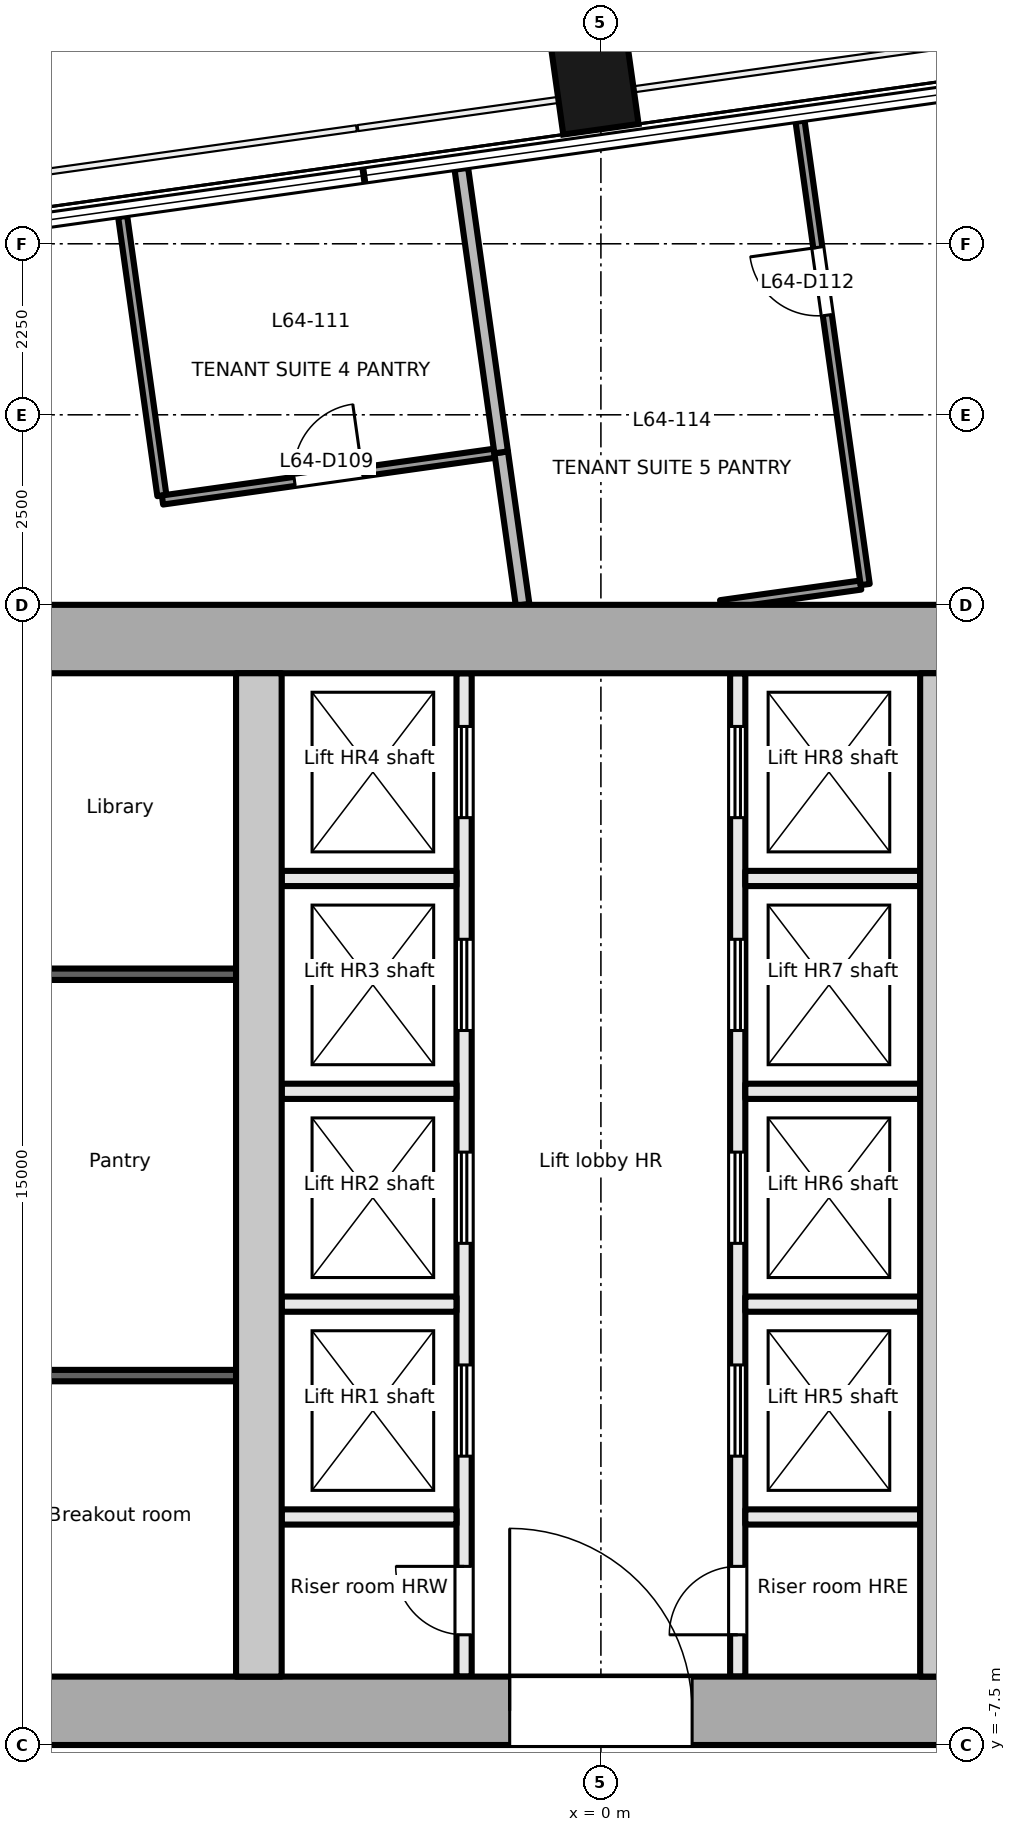
"""IFC4 building model, lengths in metres.
Left out: names, types, materials, properties, quantities, classifications, styles, units other than length and angle.
Written with IfcOpenShell. Run it as: python <this file> out.ifc"""

import sys

from ifc_helpers import new_model, si_unit, direction, frame, frame_2d, origin, origin_2d, place, context, subcontext, project, spatial, rectangle, extrude, element, fill, save


model = new_model("IFC4")
c1 = context("Model", 3, precision=1e-05, world=origin(), true_north=direction((0.0, 1.0)))
c2 = subcontext(c1, "Body", "Model", "MODEL_VIEW")
j1 = project(units=[si_unit("LENGTHUNIT", "METRE"), si_unit("PLANEANGLEUNIT", "RADIAN")], contexts=[c1])
p1 = place(None, origin())
s1 = spatial("IfcSite", under=j1, at=p1, CompositionType="ELEMENT")
p2 = place(p1, origin())
s2 = spatial("IfcBuilding", under=s1, at=p2, CompositionType="ELEMENT")
p3 = place(p2, frame((0.0, 0.0, 278.5)))
s3 = spatial("IfcBuildingStorey", under=s2, at=p3, CompositionType="ELEMENT", Elevation=278.5)
p4 = place(p3, frame((-0.125, 14.648, -0.2), z_axis=(0.0, 0.0, 1.0), x_axis=(0.990265639562, 0.139190384377, 0.0)))
e1 = element("IfcColumn", 1, at=p4, inside=s3, PredefinedType="COLUMN", context=c2, shape_type="SweptSolid", body=[
    extrude(rectangle(XDim=1.0, YDim=1.8, at=origin_2d()), origin(), (0.0, 0.0, 1.0), 3.9),
])
p5 = place(p3, frame((-18.0, -7.05, -0.2), z_axis=(0.0, 0.0, 1.0), x_axis=(1.0, 0.0, 0.0)))
e2 = element("IfcWall", 2, at=p5, inside=s3, PredefinedType="SHEAR", context=c2, shape_type="SweptSolid", body=[
    extrude(rectangle(XDim=36.0, YDim=0.9, at=frame_2d((18.0, 0.0))), origin(), (0.0, 0.0, 1.0), 3.9),
])
p6 = place(p5, frame((8.1, 0.0, 0.2)))
e3 = element("IfcOpeningElement", 3, at=p6, cuts=e2, PredefinedType="OPENING", context=c2, shape_type="SweptSolid", body=[
    extrude(rectangle(XDim=1.8, YDim=2.1, at=frame_2d((0.9, 1.05))), frame((0.0, 0.46, 0.0), z_axis=(0.0, -1.0, 0.0), x_axis=(1.0, 0.0, 0.0)), (0.0, 0.0, 1.0), 0.921),
])
p7 = place(p5, frame((16.8, 0.0, 0.2)))
e4 = element("IfcOpeningElement", 4, at=p7, cuts=e2, PredefinedType="OPENING", context=c2, shape_type="SweptSolid", body=[
    extrude(rectangle(XDim=2.4, YDim=2.1, at=frame_2d((1.2, 1.05))), frame((0.0, 0.46, 0.0), z_axis=(0.0, -1.0, 0.0), x_axis=(1.0, 0.0, 0.0)), (0.0, 0.0, 1.0), 0.921),
])
p8 = place(p5, frame((26.1, 0.0, 0.2)))
e5 = element("IfcOpeningElement", 5, at=p8, cuts=e2, PredefinedType="OPENING", context=c2, shape_type="SweptSolid", body=[
    extrude(rectangle(XDim=2.4, YDim=2.1, at=frame_2d((1.2, 1.05))), frame((0.0, 0.46, 0.0), z_axis=(0.0, -1.0, 0.0), x_axis=(1.0, 0.0, 0.0)), (0.0, 0.0, 1.0), 0.921),
])
p9 = place(p3, frame((-18.0, 7.05, -0.2), z_axis=(0.0, 0.0, 1.0), x_axis=(1.0, 0.0, 0.0)))
e6 = element("IfcWall", 6, at=p9, inside=s3, PredefinedType="SHEAR", context=c2, shape_type="SweptSolid", body=[
    extrude(rectangle(XDim=36.0, YDim=0.9, at=frame_2d((18.0, 0.0))), origin(), (0.0, 0.0, 1.0), 3.9),
])
for number, where, z_axis, x_axis in (
    (7, (-4.5, -6.6, -0.2), (0.0, 0.0, 1.0), (0.0, 1.0, 0.0)),
    (8, (4.5, -6.6, -0.2), (0.0, 0.0, 1.0), (0.0, 1.0, 0.0)),
):
    element("IfcWall", number, at=place(p3, frame(where, z_axis=z_axis, x_axis=x_axis)), inside=s3, PredefinedType="SHEAR", context=c2, shape_type="SweptSolid", body=[
        extrude(rectangle(XDim=13.2, YDim=0.6, at=frame_2d((6.6, 0.0))), origin(), (0.0, 0.0, 1.0), 3.9),
    ])
for number, where, z_axis, x_axis in (
    (9, (-7.85, -2.64, 0.0), (0.0, 0.0, 1.0), (1.0, 0.0, 0.0)),
    (10, (-7.85, 2.64, 0.0), (0.0, 0.0, 1.0), (1.0, 0.0, 0.0)),
):
    element("IfcWall", number, at=place(p3, frame(where, z_axis=z_axis, x_axis=x_axis)), inside=s3, PredefinedType="PARTITIONING", context=c2, shape_type="SweptSolid", body=[
        extrude(rectangle(XDim=3.05, YDim=0.15, at=frame_2d((1.525, 0.0))), origin(), (0.0, 0.0, 1.0), 3.7),
    ])
p10 = place(p3, frame((-1.8, -6.6, 0.0), z_axis=(0.0, 0.0, 1.0), x_axis=(0.0, 1.0, 0.0)))
e11 = element("IfcWall", 11, at=p10, inside=s3, PredefinedType="PARTITIONING", context=c2, shape_type="SweptSolid", body=[
    extrude(rectangle(XDim=13.2, YDim=0.2, at=frame_2d((6.6, 0.0))), origin(), (0.0, 0.0, 1.0), 3.7),
])
p11 = place(p10, frame((0.55, 0.0, 0.0)))
e12 = element("IfcOpeningElement", 12, at=p11, cuts=e11, PredefinedType="OPENING", context=c2, shape_type="SweptSolid", body=[
    extrude(rectangle(XDim=0.9, YDim=2.1, at=frame_2d((0.45, 1.05))), frame((0.0, 0.111, 0.0), z_axis=(0.0, -1.0, 0.0), x_axis=(1.0, 0.0, 0.0)), (0.0, 0.0, 1.0), 0.221),
])
p12 = place(p10, frame((2.9, 0.0, 0.0)))
e13 = element("IfcOpeningElement", 13, at=p12, cuts=e11, PredefinedType="OPENING", context=c2, shape_type="SweptSolid", body=[
    extrude(rectangle(XDim=1.2, YDim=2.1, at=frame_2d((0.6, 1.05))), frame((0.0, 0.111, 0.0), z_axis=(0.0, -1.0, 0.0), x_axis=(1.0, 0.0, 0.0)), (0.0, 0.0, 1.0), 0.221),
])
p13 = place(p10, frame((5.7, 0.0, 0.0)))
e14 = element("IfcOpeningElement", 14, at=p13, cuts=e11, PredefinedType="OPENING", context=c2, shape_type="SweptSolid", body=[
    extrude(rectangle(XDim=1.2, YDim=2.1, at=frame_2d((0.6, 1.05))), frame((0.0, 0.111, 0.0), z_axis=(0.0, -1.0, 0.0), x_axis=(1.0, 0.0, 0.0)), (0.0, 0.0, 1.0), 0.221),
])
p14 = place(p10, frame((8.5, 0.0, 0.0)))
e15 = element("IfcOpeningElement", 15, at=p14, cuts=e11, PredefinedType="OPENING", context=c2, shape_type="SweptSolid", body=[
    extrude(rectangle(XDim=1.2, YDim=2.1, at=frame_2d((0.6, 1.05))), frame((0.0, 0.111, 0.0), z_axis=(0.0, -1.0, 0.0), x_axis=(1.0, 0.0, 0.0)), (0.0, 0.0, 1.0), 0.221),
])
p15 = place(p10, frame((11.3, 0.0, 0.0)))
e16 = element("IfcOpeningElement", 16, at=p15, cuts=e11, PredefinedType="OPENING", context=c2, shape_type="SweptSolid", body=[
    extrude(rectangle(XDim=1.2, YDim=2.1, at=frame_2d((0.6, 1.05))), frame((0.0, 0.111, 0.0), z_axis=(0.0, -1.0, 0.0), x_axis=(1.0, 0.0, 0.0)), (0.0, 0.0, 1.0), 0.221),
])
p16 = place(p3, frame((1.8, -6.6, 0.0), z_axis=(0.0, 0.0, 1.0), x_axis=(0.0, 1.0, 0.0)))
e17 = element("IfcWall", 17, at=p16, inside=s3, PredefinedType="PARTITIONING", context=c2, shape_type="SweptSolid", body=[
    extrude(rectangle(XDim=13.2, YDim=0.2, at=frame_2d((6.6, 0.0))), origin(), (0.0, 0.0, 1.0), 3.7),
])
p17 = place(p16, frame((0.55, 0.0, 0.0)))
e18 = element("IfcOpeningElement", 18, at=p17, cuts=e17, PredefinedType="OPENING", context=c2, shape_type="SweptSolid", body=[
    extrude(rectangle(XDim=0.9, YDim=2.1, at=frame_2d((0.45, 1.05))), frame((0.0, 0.111, 0.0), z_axis=(0.0, -1.0, 0.0), x_axis=(1.0, 0.0, 0.0)), (0.0, 0.0, 1.0), 0.221),
])
p18 = place(p16, frame((2.9, 0.0, 0.0)))
e19 = element("IfcOpeningElement", 19, at=p18, cuts=e17, PredefinedType="OPENING", context=c2, shape_type="SweptSolid", body=[
    extrude(rectangle(XDim=1.2, YDim=2.1, at=frame_2d((0.6, 1.05))), frame((0.0, 0.111, 0.0), z_axis=(0.0, -1.0, 0.0), x_axis=(1.0, 0.0, 0.0)), (0.0, 0.0, 1.0), 0.221),
])
p19 = place(p16, frame((5.7, 0.0, 0.0)))
e20 = element("IfcOpeningElement", 20, at=p19, cuts=e17, PredefinedType="OPENING", context=c2, shape_type="SweptSolid", body=[
    extrude(rectangle(XDim=1.2, YDim=2.1, at=frame_2d((0.6, 1.05))), frame((0.0, 0.111, 0.0), z_axis=(0.0, -1.0, 0.0), x_axis=(1.0, 0.0, 0.0)), (0.0, 0.0, 1.0), 0.221),
])
p20 = place(p16, frame((8.5, 0.0, 0.0)))
e21 = element("IfcOpeningElement", 21, at=p20, cuts=e17, PredefinedType="OPENING", context=c2, shape_type="SweptSolid", body=[
    extrude(rectangle(XDim=1.2, YDim=2.1, at=frame_2d((0.6, 1.05))), frame((0.0, 0.111, 0.0), z_axis=(0.0, -1.0, 0.0), x_axis=(1.0, 0.0, 0.0)), (0.0, 0.0, 1.0), 0.221),
])
p21 = place(p16, frame((11.3, 0.0, 0.0)))
e22 = element("IfcOpeningElement", 22, at=p21, cuts=e17, PredefinedType="OPENING", context=c2, shape_type="SweptSolid", body=[
    extrude(rectangle(XDim=1.2, YDim=2.1, at=frame_2d((0.6, 1.05))), frame((0.0, 0.111, 0.0), z_axis=(0.0, -1.0, 0.0), x_axis=(1.0, 0.0, 0.0)), (0.0, 0.0, 1.0), 0.221),
])
for number, where, z_axis, x_axis in (
    (23, (-4.2, -1.7, 0.0), (0.0, 0.0, 1.0), (1.0, 0.0, 0.0)),
    (24, (-4.2, 1.1, 0.0), (0.0, 0.0, 1.0), (1.0, 0.0, 0.0)),
    (25, (-4.2, 3.9, 0.0), (0.0, 0.0, 1.0), (1.0, 0.0, 0.0)),
    (26, (-4.2, -4.5, 0.0), (0.0, 0.0, 1.0), (1.0, 0.0, 0.0)),
    (27, (1.9, -1.7, 0.0), (0.0, 0.0, 1.0), (1.0, 0.0, 0.0)),
    (28, (1.9, 1.1, 0.0), (0.0, 0.0, 1.0), (1.0, 0.0, 0.0)),
    (29, (1.9, 3.9, 0.0), (0.0, 0.0, 1.0), (1.0, 0.0, 0.0)),
    (30, (1.9, -4.5, 0.0), (0.0, 0.0, 1.0), (1.0, 0.0, 0.0)),
):
    element("IfcWall", number, at=place(p3, frame(where, z_axis=z_axis, x_axis=x_axis)), inside=s3, PredefinedType="PARTITIONING", context=c2, shape_type="SweptSolid", body=[
        extrude(rectangle(XDim=2.3, YDim=0.2, at=frame_2d((1.15, 0.0))), origin(), (0.0, 0.0, 1.0), 3.7),
    ])
p22 = place(p3, frame((-6.292, 12.61, 0.0), z_axis=(0.0, 0.0, 1.0), x_axis=(0.13918119099, -0.990266931728, 0.0)))
e31 = element("IfcWall", 31, at=p22, inside=s3, PredefinedType="PARTITIONING", context=c2, shape_type="SweptSolid", body=[
    extrude(rectangle(XDim=3.708, YDim=0.12, at=frame_2d((1.854, 0.0))), origin(), (0.0, 0.0, 1.0), 3.7),
])
p23 = place(p3, frame((-5.768, 8.879, 0.0), z_axis=(0.0, 0.0, 1.0), x_axis=(0.990229842837, 0.139444821898, 0.0)))
e32 = element("IfcWall", 32, at=p23, inside=s3, PredefinedType="PARTITIONING", context=c2, shape_type="SweptSolid", body=[
    extrude(rectangle(XDim=4.41, YDim=0.12, at=frame_2d((2.205, 0.0))), origin(), (0.0, 0.0, 1.0), 3.4),
])
p24 = place(p23, frame((1.755, 0.0, 0.0)))
e33 = element("IfcOpeningElement", 33, at=p24, cuts=e32, PredefinedType="OPENING", context=c2, shape_type="SweptSolid", body=[
    extrude(rectangle(XDim=0.9, YDim=2.1, at=frame_2d((0.45, 1.05))), frame((0.0, 0.071, 0.0), z_axis=(0.0, -1.0, 0.0), x_axis=(1.0, 0.0, 0.0)), (0.0, 0.0, 1.0), 0.141),
])
p25 = place(p3, frame((-1.312, 9.506, 0.0), z_axis=(0.0, 0.0, 1.0), x_axis=(0.139193896019, -0.990265145964, 0.0)))
e34 = element("IfcWall", 34, at=p25, inside=s3, PredefinedType="PARTITIONING", context=c2, shape_type="SweptSolid", body=[
    extrude(rectangle(XDim=2.026, YDim=0.18, at=frame_2d((1.013, 0.0))), origin(), (0.0, 0.0, 1.0), 3.7),
])
p26 = place(p3, frame((-1.836, 13.237, 0.0), z_axis=(0.0, 0.0, 1.0), x_axis=(0.139062210866, -0.990283646997, 0.0)))
e35 = element("IfcWall", 35, at=p26, inside=s3, PredefinedType="PARTITIONING", context=c2, shape_type="SweptSolid", body=[
    extrude(rectangle(XDim=3.768, YDim=0.18, at=frame_2d((1.884, 0.0))), origin(), (0.0, 0.0, 1.0), 3.7),
])
p27 = place(p3, frame((1.576, 7.502, 0.0), z_axis=(0.0, 0.0, 1.0), x_axis=(0.990319013032, 0.138810130855, 0.0)))
e36 = element("IfcWall", 36, at=p27, inside=s3, PredefinedType="PARTITIONING", context=c2, shape_type="SweptSolid", body=[
    extrude(rectangle(XDim=1.859, YDim=0.12, at=frame_2d((0.93, 0.0))), origin(), (0.0, 0.0, 1.0), 3.7),
])
p28 = place(p3, frame((3.477, 7.767, 0.0), z_axis=(0.0, 0.0, 1.0), x_axis=(-0.13920561026, 0.990263499313, 0.0)))
e37 = element("IfcWall", 37, at=p28, inside=s3, PredefinedType="PARTITIONING", context=c2, shape_type="SweptSolid", body=[
    extrude(rectangle(XDim=6.156, YDim=0.12, at=frame_2d((3.078, 0.0))), origin(), (0.0, 0.0, 1.0), 3.7),
])
p29 = place(p28, frame((3.579, 0.0, 0.0)))
e38 = element("IfcOpeningElement", 38, at=p29, cuts=e37, PredefinedType="OPENING", context=c2, shape_type="SweptSolid", body=[
    extrude(rectangle(XDim=0.9, YDim=2.1, at=frame_2d((0.45, 1.05))), frame((0.0, 0.071, 0.0), z_axis=(0.0, -1.0, 0.0), x_axis=(1.0, 0.0, 0.0)), (0.0, 0.0, 1.0), 0.141),
])
p30 = place(p11, origin())
e39 = element("IfcDoor", 39, at=p30, inside=s3, OperationType="SINGLE_SWING_RIGHT", PredefinedType="DOOR", context=c2, shape_type="SweptSolid", body=[
    extrude(rectangle(XDim=0.9, YDim=2.1, at=frame_2d((0.45, 1.05))), frame((0.0, 0.025, 0.0), z_axis=(0.0, -1.0, 0.0), x_axis=(1.0, 0.0, 0.0)), (0.0, 0.0, 1.0), 0.05),
])
fill(e12, e39)
p31 = place(p12, origin())
e40 = element("IfcDoor", 40, at=p31, inside=s3, OperationType="DOUBLE_DOOR_SLIDING", PredefinedType="DOOR", context=c2, shape_type="SweptSolid", body=[
    extrude(rectangle(XDim=1.2, YDim=2.1, at=frame_2d((0.6, 1.05))), frame((0.0, 0.025, 0.0), z_axis=(0.0, -1.0, 0.0), x_axis=(1.0, 0.0, 0.0)), (0.0, 0.0, 1.0), 0.05),
])
fill(e13, e40)
p32 = place(p13, origin())
e41 = element("IfcDoor", 41, at=p32, inside=s3, OperationType="DOUBLE_DOOR_SLIDING", PredefinedType="DOOR", context=c2, shape_type="SweptSolid", body=[
    extrude(rectangle(XDim=1.2, YDim=2.1, at=frame_2d((0.6, 1.05))), frame((0.0, 0.025, 0.0), z_axis=(0.0, -1.0, 0.0), x_axis=(1.0, 0.0, 0.0)), (0.0, 0.0, 1.0), 0.05),
])
fill(e14, e41)
p33 = place(p14, origin())
e42 = element("IfcDoor", 42, at=p33, inside=s3, OperationType="DOUBLE_DOOR_SLIDING", PredefinedType="DOOR", context=c2, shape_type="SweptSolid", body=[
    extrude(rectangle(XDim=1.2, YDim=2.1, at=frame_2d((0.6, 1.05))), frame((0.0, 0.025, 0.0), z_axis=(0.0, -1.0, 0.0), x_axis=(1.0, 0.0, 0.0)), (0.0, 0.0, 1.0), 0.05),
])
fill(e15, e42)
p34 = place(p15, origin())
e43 = element("IfcDoor", 43, at=p34, inside=s3, OperationType="DOUBLE_DOOR_SLIDING", PredefinedType="DOOR", context=c2, shape_type="SweptSolid", body=[
    extrude(rectangle(XDim=1.2, YDim=2.1, at=frame_2d((0.6, 1.05))), frame((0.0, 0.025, 0.0), z_axis=(0.0, -1.0, 0.0), x_axis=(1.0, 0.0, 0.0)), (0.0, 0.0, 1.0), 0.05),
])
fill(e16, e43)
p35 = place(p17, origin())
e44 = element("IfcDoor", 44, at=p35, inside=s3, OperationType="SINGLE_SWING_LEFT", PredefinedType="DOOR", context=c2, shape_type="SweptSolid", body=[
    extrude(rectangle(XDim=0.9, YDim=2.1, at=frame_2d((0.45, 1.05))), frame((0.0, 0.025, 0.0), z_axis=(0.0, -1.0, 0.0), x_axis=(1.0, 0.0, 0.0)), (0.0, 0.0, 1.0), 0.05),
])
fill(e18, e44)
p36 = place(p18, origin())
e45 = element("IfcDoor", 45, at=p36, inside=s3, OperationType="DOUBLE_DOOR_SLIDING", PredefinedType="DOOR", context=c2, shape_type="SweptSolid", body=[
    extrude(rectangle(XDim=1.2, YDim=2.1, at=frame_2d((0.6, 1.05))), frame((0.0, 0.025, 0.0), z_axis=(0.0, -1.0, 0.0), x_axis=(1.0, 0.0, 0.0)), (0.0, 0.0, 1.0), 0.05),
])
fill(e19, e45)
p37 = place(p19, origin())
e46 = element("IfcDoor", 46, at=p37, inside=s3, OperationType="DOUBLE_DOOR_SLIDING", PredefinedType="DOOR", context=c2, shape_type="SweptSolid", body=[
    extrude(rectangle(XDim=1.2, YDim=2.1, at=frame_2d((0.6, 1.05))), frame((0.0, 0.025, 0.0), z_axis=(0.0, -1.0, 0.0), x_axis=(1.0, 0.0, 0.0)), (0.0, 0.0, 1.0), 0.05),
])
fill(e20, e46)
p38 = place(p20, origin())
e47 = element("IfcDoor", 47, at=p38, inside=s3, OperationType="DOUBLE_DOOR_SLIDING", PredefinedType="DOOR", context=c2, shape_type="SweptSolid", body=[
    extrude(rectangle(XDim=1.2, YDim=2.1, at=frame_2d((0.6, 1.05))), frame((0.0, 0.025, 0.0), z_axis=(0.0, -1.0, 0.0), x_axis=(1.0, 0.0, 0.0)), (0.0, 0.0, 1.0), 0.05),
])
fill(e21, e47)
p39 = place(p21, origin())
e48 = element("IfcDoor", 48, at=p39, inside=s3, OperationType="DOUBLE_DOOR_SLIDING", PredefinedType="DOOR", context=c2, shape_type="SweptSolid", body=[
    extrude(rectangle(XDim=1.2, YDim=2.1, at=frame_2d((0.6, 1.05))), frame((0.0, 0.025, 0.0), z_axis=(0.0, -1.0, 0.0), x_axis=(1.0, 0.0, 0.0)), (0.0, 0.0, 1.0), 0.05),
])
fill(e22, e48)
p40 = place(p7, origin())
e49 = element("IfcDoor", 49, at=p40, inside=s3, OperationType="DOUBLE_DOOR_DOUBLE_SWING", PredefinedType="DOOR", context=c2, shape_type="SweptSolid", body=[
    extrude(rectangle(XDim=2.4, YDim=2.1, at=frame_2d((1.2, 1.05))), frame((0.0, 0.025, 0.0), z_axis=(0.0, -1.0, 0.0), x_axis=(1.0, 0.0, 0.0)), (0.0, 0.0, 1.0), 0.05),
])
fill(e4, e49)
p41 = place(p24, origin())
e50 = element("IfcDoor", 50, at=p41, inside=s3, OperationType="SINGLE_SWING_RIGHT", PredefinedType="DOOR", context=c2, shape_type="SweptSolid", body=[
    extrude(rectangle(XDim=0.9, YDim=2.1, at=frame_2d((0.45, 1.05))), frame((0.0, 0.025, 0.0), z_axis=(0.0, -1.0, 0.0), x_axis=(1.0, 0.0, 0.0)), (0.0, 0.0, 1.0), 0.05),
])
fill(e33, e50)
p42 = place(p29, origin())
e51 = element("IfcDoor", 51, at=p42, inside=s3, OperationType="SINGLE_SWING_RIGHT", PredefinedType="DOOR", context=c2, shape_type="SweptSolid", body=[
    extrude(rectangle(XDim=0.9, YDim=2.1, at=frame_2d((0.45, 1.05))), frame((0.0, 0.025, 0.0), z_axis=(0.0, -1.0, 0.0), x_axis=(1.0, 0.0, 0.0)), (0.0, 0.0, 1.0), 0.05),
])
fill(e38, e51)
save(model, sys.argv[1])
